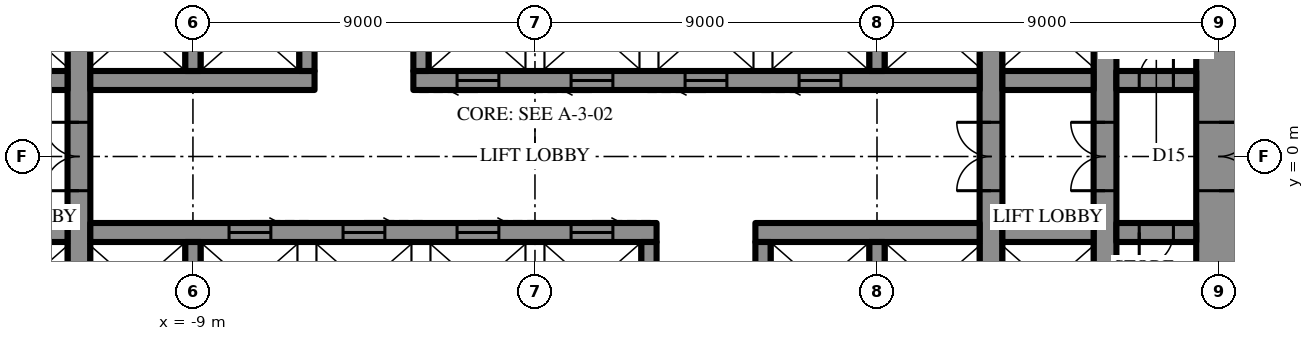
"""IFC4 building model, lengths in metres.
Left out: names, types, materials, properties, quantities, classifications, styles, units other than length and angle.
Written with IfcOpenShell. Run it as: python <this file> out.ifc"""

import sys

from ifc_helpers import new_model, si_unit, direction, frame, frame_2d, origin, place, context, subcontext, project, spatial, rectangle, extrude, element, fill, save


model = new_model("IFC4")
c1 = context("Model", 3, precision=1e-05, world=origin(), true_north=direction((0.0, 1.0)))
c2 = subcontext(c1, "Body", "Model", "MODEL_VIEW")
j1 = project(units=[si_unit("LENGTHUNIT", "METRE"), si_unit("PLANEANGLEUNIT", "RADIAN")], contexts=[c1])
p1 = place(None, origin())
s1 = spatial("IfcSite", under=j1, at=p1, CompositionType="ELEMENT")
p2 = place(p1, origin())
s2 = spatial("IfcBuilding", under=s1, at=p2, CompositionType="ELEMENT")
p3 = place(p2, frame((0.0, 0.0, 182.5)))
s3 = spatial("IfcBuildingStorey", under=s2, at=p3, CompositionType="ELEMENT", Elevation=182.5)
p4 = place(p3, frame((18.0, -10.7, 0.0), z_axis=(0.0, 0.0, 1.0), x_axis=(0.0, 1.0, 0.0)))
e1 = element("IfcWall", 1, at=p4, inside=s3, PredefinedType="SHEAR", context=c2, shape_type="SweptSolid", body=[
    extrude(rectangle(XDim=21.4, YDim=1.2, at=frame_2d((10.7, 0.0))), origin(), (0.0, 0.0, 1.0), 4.2),
])
p5 = place(p4, frame((9.8, 0.0, 0.0)))
e2 = element("IfcOpeningElement", 2, at=p5, cuts=e1, PredefinedType="OPENING", context=c2, shape_type="SweptSolid", body=[
    extrude(rectangle(XDim=1.8, YDim=2.4, at=frame_2d((0.9, 1.2))), frame((0.0, 0.61, 0.0), z_axis=(0.0, -1.0, 0.0), x_axis=(1.0, 0.0, 0.0)), (0.0, 0.0, 1.0), 1.22),
])
p6 = place(p3, frame((12.0, -10.7, 0.0), z_axis=(0.0, 0.0, 1.0), x_axis=(0.0, 1.0, 0.0)))
e3 = element("IfcWall", 3, at=p6, inside=s3, PredefinedType="SHEAR", context=c2, shape_type="SweptSolid", body=[
    extrude(rectangle(XDim=21.4, YDim=0.6, at=frame_2d((10.7, 0.0))), origin(), (0.0, 0.0, 1.0), 4.2),
])
p7 = place(p6, frame((9.8, 0.0, 0.0)))
e4 = element("IfcOpeningElement", 4, at=p7, cuts=e3, PredefinedType="OPENING", context=c2, shape_type="SweptSolid", body=[
    extrude(rectangle(XDim=1.8, YDim=2.4, at=frame_2d((0.9, 1.2))), frame((0.0, 0.31, 0.0), z_axis=(0.0, -1.0, 0.0), x_axis=(1.0, 0.0, 0.0)), (0.0, 0.0, 1.0), 0.62),
])
p8 = place(p3, frame((-12.0, -10.7, 0.0), z_axis=(0.0, 0.0, 1.0), x_axis=(0.0, 1.0, 0.0)))
e5 = element("IfcWall", 5, at=p8, inside=s3, PredefinedType="SHEAR", context=c2, shape_type="SweptSolid", body=[
    extrude(rectangle(XDim=21.4, YDim=0.6, at=frame_2d((10.7, 0.0))), origin(), (0.0, 0.0, 1.0), 4.2),
])
p9 = place(p8, frame((9.8, 0.0, 0.0)))
e6 = element("IfcOpeningElement", 6, at=p9, cuts=e5, PredefinedType="OPENING", context=c2, shape_type="SweptSolid", body=[
    extrude(rectangle(XDim=1.8, YDim=2.4, at=frame_2d((0.9, 1.2))), frame((0.0, 0.31, 0.0), z_axis=(0.0, -1.0, 0.0), x_axis=(1.0, 0.0, 0.0)), (0.0, 0.0, 1.0), 0.62),
])
p10 = place(p3, frame((15.0, -10.7, 0.0), z_axis=(0.0, 0.0, 1.0), x_axis=(0.0, 1.0, 0.0)))
e7 = element("IfcWall", 7, at=p10, inside=s3, PredefinedType="SHEAR", context=c2, shape_type="SweptSolid", body=[
    extrude(rectangle(XDim=21.4, YDim=0.6, at=frame_2d((10.7, 0.0))), origin(), (0.0, 0.0, 1.0), 4.2),
])
p11 = place(p10, frame((9.8, 0.0, 0.0)))
e8 = element("IfcOpeningElement", 8, at=p11, cuts=e7, PredefinedType="OPENING", context=c2, shape_type="SweptSolid", body=[
    extrude(rectangle(XDim=1.8, YDim=2.4, at=frame_2d((0.9, 1.2))), frame((0.0, 0.31, 0.0), z_axis=(0.0, -1.0, 0.0), x_axis=(1.0, 0.0, 0.0)), (0.0, 0.0, 1.0), 0.62),
])
p12 = place(p3, frame((-14.7, 2.0, 0.0), z_axis=(0.0, 0.0, 1.0), x_axis=(1.0, 0.0, 0.0)))
e9 = element("IfcWall", 9, at=p12, inside=s3, PredefinedType="SHEAR", context=c2, shape_type="SweptSolid", body=[
    extrude(rectangle(XDim=2.4, YDim=0.5, at=frame_2d((1.2, 0.0))), origin(), (0.0, 0.0, 1.0), 4.2),
])
p13 = place(p3, frame((-11.7, 2.0, 0.0), z_axis=(0.0, 0.0, 1.0), x_axis=(1.0, 0.0, 0.0)))
e10 = element("IfcWall", 10, at=p13, inside=s3, PredefinedType="SHEAR", context=c2, shape_type="SweptSolid", body=[
    extrude(rectangle(XDim=5.9, YDim=0.5, at=frame_2d((2.95, 0.0))), origin(), (0.0, 0.0, 1.0), 4.2),
])
p14 = place(p3, frame((-3.2, 2.0, 0.0), z_axis=(0.0, 0.0, 1.0), x_axis=(1.0, 0.0, 0.0)))
e11 = element("IfcWall", 11, at=p14, inside=s3, PredefinedType="SHEAR", context=c2, shape_type="SweptSolid", body=[
    extrude(rectangle(XDim=14.9, YDim=0.5, at=frame_2d((7.45, 0.0))), origin(), (0.0, 0.0, 1.0), 4.2),
])
p15 = place(p14, frame((1.15, 0.0, 0.0)))
e12 = element("IfcOpeningElement", 12, at=p15, cuts=e11, PredefinedType="OPENING", context=c2, shape_type="SweptSolid", body=[
    extrude(rectangle(XDim=1.1, YDim=2.2, at=frame_2d((0.55, 1.1))), frame((0.0, 0.26, 0.0), z_axis=(0.0, -1.0, 0.0), x_axis=(1.0, 0.0, 0.0)), (0.0, 0.0, 1.0), 0.52),
])
p16 = place(p14, frame((4.15, 0.0, 0.0)))
e13 = element("IfcOpeningElement", 13, at=p16, cuts=e11, PredefinedType="OPENING", context=c2, shape_type="SweptSolid", body=[
    extrude(rectangle(XDim=1.1, YDim=2.2, at=frame_2d((0.55, 1.1))), frame((0.0, 0.26, 0.0), z_axis=(0.0, -1.0, 0.0), x_axis=(1.0, 0.0, 0.0)), (0.0, 0.0, 1.0), 0.52),
])
p17 = place(p14, frame((7.15, 0.0, 0.0)))
e14 = element("IfcOpeningElement", 14, at=p17, cuts=e11, PredefinedType="OPENING", context=c2, shape_type="SweptSolid", body=[
    extrude(rectangle(XDim=1.1, YDim=2.2, at=frame_2d((0.55, 1.1))), frame((0.0, 0.26, 0.0), z_axis=(0.0, -1.0, 0.0), x_axis=(1.0, 0.0, 0.0)), (0.0, 0.0, 1.0), 0.52),
])
p18 = place(p14, frame((10.15, 0.0, 0.0)))
e15 = element("IfcOpeningElement", 15, at=p18, cuts=e11, PredefinedType="OPENING", context=c2, shape_type="SweptSolid", body=[
    extrude(rectangle(XDim=1.1, YDim=2.2, at=frame_2d((0.55, 1.1))), frame((0.0, 0.26, 0.0), z_axis=(0.0, -1.0, 0.0), x_axis=(1.0, 0.0, 0.0)), (0.0, 0.0, 1.0), 0.52),
])
p19 = place(p3, frame((12.3, 2.0, 0.0), z_axis=(0.0, 0.0, 1.0), x_axis=(1.0, 0.0, 0.0)))
e16 = element("IfcWall", 16, at=p19, inside=s3, PredefinedType="SHEAR", context=c2, shape_type="SweptSolid", body=[
    extrude(rectangle(XDim=2.4, YDim=0.5, at=frame_2d((1.2, 0.0))), origin(), (0.0, 0.0, 1.0), 4.2),
])
p20 = place(p3, frame((15.3, 2.0, 0.0), z_axis=(0.0, 0.0, 1.0), x_axis=(1.0, 0.0, 0.0)))
e17 = element("IfcWall", 17, at=p20, inside=s3, PredefinedType="SHEAR", context=c2, shape_type="SweptSolid", body=[
    extrude(rectangle(XDim=2.1, YDim=0.5, at=frame_2d((1.05, 0.0))), origin(), (0.0, 0.0, 1.0), 4.2),
])
p21 = place(p20, frame((0.6, 0.0, 0.0)))
e18 = element("IfcOpeningElement", 18, at=p21, cuts=e17, PredefinedType="OPENING", context=c2, shape_type="SweptSolid", body=[
    extrude(rectangle(XDim=0.9, YDim=2.2, at=frame_2d((0.45, 1.1))), frame((0.0, 0.26, 0.0), z_axis=(0.0, -1.0, 0.0), x_axis=(1.0, 0.0, 0.0)), (0.0, 0.0, 1.0), 0.52),
])
for number, where, z_axis, x_axis in (
    (19, (-9.0, 2.25, 0.0), (0.0, 0.0, 1.0), (0.0, 1.0, 0.0)),
    (20, (-6.0, 2.25, 0.0), (0.0, 0.0, 1.0), (0.0, 1.0, 0.0)),
    (21, (-3.0, 2.25, 0.0), (0.0, 0.0, 1.0), (0.0, 1.0, 0.0)),
    (22, (9.0, 2.25, 0.0), (0.0, 0.0, 1.0), (0.0, 1.0, 0.0)),
):
    element("IfcWall", number, at=place(p3, frame(where, z_axis=z_axis, x_axis=x_axis)), inside=s3, PredefinedType="SHEAR", context=c2, shape_type="SweptSolid", body=[
        extrude(rectangle(XDim=2.3, YDim=0.4, at=frame_2d((1.15, 0.0))), origin(), (0.0, 0.0, 1.0), 4.2),
    ])
p22 = place(p3, frame((17.4, -2.0, 0.0), z_axis=(0.0, 0.0, 1.0), x_axis=(-1.0, 0.0, 0.0)))
e23 = element("IfcWall", 23, at=p22, inside=s3, PredefinedType="SHEAR", context=c2, shape_type="SweptSolid", body=[
    extrude(rectangle(XDim=2.1, YDim=0.5, at=frame_2d((1.05, 0.0))), origin(), (0.0, 0.0, 1.0), 4.2),
])
p23 = place(p22, frame((0.6, 0.0, 0.0)))
e24 = element("IfcOpeningElement", 24, at=p23, cuts=e23, PredefinedType="OPENING", context=c2, shape_type="SweptSolid", body=[
    extrude(rectangle(XDim=0.9, YDim=2.2, at=frame_2d((0.45, 1.1))), frame((0.0, 0.26, 0.0), z_axis=(0.0, -1.0, 0.0), x_axis=(1.0, 0.0, 0.0)), (0.0, 0.0, 1.0), 0.52),
])
p24 = place(p3, frame((14.7, -2.0, 0.0), z_axis=(0.0, 0.0, 1.0), x_axis=(-1.0, 0.0, 0.0)))
e25 = element("IfcWall", 25, at=p24, inside=s3, PredefinedType="SHEAR", context=c2, shape_type="SweptSolid", body=[
    extrude(rectangle(XDim=2.4, YDim=0.5, at=frame_2d((1.2, 0.0))), origin(), (0.0, 0.0, 1.0), 4.2),
])
p25 = place(p3, frame((11.7, -2.0, 0.0), z_axis=(0.0, 0.0, 1.0), x_axis=(-1.0, 0.0, 0.0)))
e26 = element("IfcWall", 26, at=p25, inside=s3, PredefinedType="SHEAR", context=c2, shape_type="SweptSolid", body=[
    extrude(rectangle(XDim=5.9, YDim=0.5, at=frame_2d((2.95, 0.0))), origin(), (0.0, 0.0, 1.0), 4.2),
])
p26 = place(p3, frame((3.2, -2.0, 0.0), z_axis=(0.0, 0.0, 1.0), x_axis=(-1.0, 0.0, 0.0)))
e27 = element("IfcWall", 27, at=p26, inside=s3, PredefinedType="SHEAR", context=c2, shape_type="SweptSolid", body=[
    extrude(rectangle(XDim=14.9, YDim=0.5, at=frame_2d((7.45, 0.0))), origin(), (0.0, 0.0, 1.0), 4.2),
])
p27 = place(p26, frame((1.15, 0.0, 0.0)))
e28 = element("IfcOpeningElement", 28, at=p27, cuts=e27, PredefinedType="OPENING", context=c2, shape_type="SweptSolid", body=[
    extrude(rectangle(XDim=1.1, YDim=2.2, at=frame_2d((0.55, 1.1))), frame((0.0, 0.26, 0.0), z_axis=(0.0, -1.0, 0.0), x_axis=(1.0, 0.0, 0.0)), (0.0, 0.0, 1.0), 0.52),
])
p28 = place(p26, frame((4.15, 0.0, 0.0)))
e29 = element("IfcOpeningElement", 29, at=p28, cuts=e27, PredefinedType="OPENING", context=c2, shape_type="SweptSolid", body=[
    extrude(rectangle(XDim=1.1, YDim=2.2, at=frame_2d((0.55, 1.1))), frame((0.0, 0.26, 0.0), z_axis=(0.0, -1.0, 0.0), x_axis=(1.0, 0.0, 0.0)), (0.0, 0.0, 1.0), 0.52),
])
p29 = place(p26, frame((7.15, 0.0, 0.0)))
e30 = element("IfcOpeningElement", 30, at=p29, cuts=e27, PredefinedType="OPENING", context=c2, shape_type="SweptSolid", body=[
    extrude(rectangle(XDim=1.1, YDim=2.2, at=frame_2d((0.55, 1.1))), frame((0.0, 0.26, 0.0), z_axis=(0.0, -1.0, 0.0), x_axis=(1.0, 0.0, 0.0)), (0.0, 0.0, 1.0), 0.52),
])
p30 = place(p26, frame((10.15, 0.0, 0.0)))
e31 = element("IfcOpeningElement", 31, at=p30, cuts=e27, PredefinedType="OPENING", context=c2, shape_type="SweptSolid", body=[
    extrude(rectangle(XDim=1.1, YDim=2.2, at=frame_2d((0.55, 1.1))), frame((0.0, 0.26, 0.0), z_axis=(0.0, -1.0, 0.0), x_axis=(1.0, 0.0, 0.0)), (0.0, 0.0, 1.0), 0.52),
])
p31 = place(p3, frame((-12.3, -2.0, 0.0), z_axis=(0.0, 0.0, 1.0), x_axis=(-1.0, 0.0, 0.0)))
e32 = element("IfcWall", 32, at=p31, inside=s3, PredefinedType="SHEAR", context=c2, shape_type="SweptSolid", body=[
    extrude(rectangle(XDim=2.4, YDim=0.5, at=frame_2d((1.2, 0.0))), origin(), (0.0, 0.0, 1.0), 4.2),
])
for number, where, z_axis, x_axis in (
    (33, (9.0, -2.25, 0.0), (0.0, 0.0, 1.0), (0.0, -1.0, 0.0)),
    (34, (6.0, -2.25, 0.0), (0.0, 0.0, 1.0), (0.0, -1.0, 0.0)),
    (35, (3.0, -2.25, 0.0), (0.0, 0.0, 1.0), (0.0, -1.0, 0.0)),
    (36, (-9.0, -2.25, 0.0), (0.0, 0.0, 1.0), (0.0, -1.0, 0.0)),
):
    element("IfcWall", number, at=place(p3, frame(where, z_axis=z_axis, x_axis=x_axis)), inside=s3, PredefinedType="SHEAR", context=c2, shape_type="SweptSolid", body=[
        extrude(rectangle(XDim=2.3, YDim=0.4, at=frame_2d((1.15, 0.0))), origin(), (0.0, 0.0, 1.0), 4.2),
    ])
p32 = place(p5, frame((1.8, 0.0, 0.0), z_axis=(0.0, 0.0, 1.0), x_axis=(-1.0, 0.0, 0.0)))
e37 = element("IfcDoor", 37, at=p32, inside=s3, OperationType="DOUBLE_DOOR_SINGLE_SWING", PredefinedType="DOOR", context=c2, shape_type="SweptSolid", body=[
    extrude(rectangle(XDim=1.8, YDim=2.4, at=frame_2d((0.9, 1.2))), frame((0.0, 0.025, 0.0), z_axis=(0.0, -1.0, 0.0), x_axis=(1.0, 0.0, 0.0)), (0.0, 0.0, 1.0), 0.05),
])
fill(e2, e37)
p33 = place(p21, origin())
e38 = element("IfcDoor", 38, at=p33, inside=s3, OperationType="SINGLE_SWING_LEFT", PredefinedType="DOOR", context=c2, shape_type="SweptSolid", body=[
    extrude(rectangle(XDim=0.9, YDim=2.2, at=frame_2d((0.45, 1.1))), frame((0.0, 0.025, 0.0), z_axis=(0.0, -1.0, 0.0), x_axis=(1.0, 0.0, 0.0)), (0.0, 0.0, 1.0), 0.05),
])
fill(e18, e38)
p34 = place(p23, origin())
e39 = element("IfcDoor", 39, at=p34, inside=s3, OperationType="SINGLE_SWING_LEFT", PredefinedType="DOOR", context=c2, shape_type="SweptSolid", body=[
    extrude(rectangle(XDim=0.9, YDim=2.2, at=frame_2d((0.45, 1.1))), frame((0.0, 0.025, 0.0), z_axis=(0.0, -1.0, 0.0), x_axis=(1.0, 0.0, 0.0)), (0.0, 0.0, 1.0), 0.05),
])
fill(e24, e39)
p35 = place(p7, origin())
e40 = element("IfcDoor", 40, at=p35, inside=s3, OperationType="DOUBLE_DOOR_SINGLE_SWING", PredefinedType="DOOR", context=c2, shape_type="SweptSolid", body=[
    extrude(rectangle(XDim=1.8, YDim=2.4, at=frame_2d((0.9, 1.2))), frame((0.0, 0.025, 0.0), z_axis=(0.0, -1.0, 0.0), x_axis=(1.0, 0.0, 0.0)), (0.0, 0.0, 1.0), 0.05),
])
fill(e4, e40)
p36 = place(p9, origin())
e41 = element("IfcDoor", 41, at=p36, inside=s3, OperationType="DOUBLE_DOOR_SINGLE_SWING", PredefinedType="DOOR", context=c2, shape_type="SweptSolid", body=[
    extrude(rectangle(XDim=1.8, YDim=2.4, at=frame_2d((0.9, 1.2))), frame((0.0, 0.025, 0.0), z_axis=(0.0, -1.0, 0.0), x_axis=(1.0, 0.0, 0.0)), (0.0, 0.0, 1.0), 0.05),
])
fill(e6, e41)
p37 = place(p11, origin())
e42 = element("IfcDoor", 42, at=p37, inside=s3, OperationType="DOUBLE_DOOR_SINGLE_SWING", PredefinedType="DOOR", context=c2, shape_type="SweptSolid", body=[
    extrude(rectangle(XDim=1.8, YDim=2.4, at=frame_2d((0.9, 1.2))), frame((0.0, 0.025, 0.0), z_axis=(0.0, -1.0, 0.0), x_axis=(1.0, 0.0, 0.0)), (0.0, 0.0, 1.0), 0.05),
])
fill(e8, e42)
p38 = place(p15, frame((1.1, 0.0, 0.0), z_axis=(0.0, 0.0, 1.0), x_axis=(-1.0, 0.0, 0.0)))
e43 = element("IfcDoor", 43, at=p38, inside=s3, OperationType="SLIDING_TO_LEFT", PredefinedType="DOOR", context=c2, shape_type="SweptSolid", body=[
    extrude(rectangle(XDim=1.1, YDim=2.2, at=frame_2d((0.55, 1.1))), frame((0.0, 0.025, 0.0), z_axis=(0.0, -1.0, 0.0), x_axis=(1.0, 0.0, 0.0)), (0.0, 0.0, 1.0), 0.05),
])
fill(e12, e43)
p39 = place(p16, frame((1.1, 0.0, 0.0), z_axis=(0.0, 0.0, 1.0), x_axis=(-1.0, 0.0, 0.0)))
e44 = element("IfcDoor", 44, at=p39, inside=s3, OperationType="SLIDING_TO_LEFT", PredefinedType="DOOR", context=c2, shape_type="SweptSolid", body=[
    extrude(rectangle(XDim=1.1, YDim=2.2, at=frame_2d((0.55, 1.1))), frame((0.0, 0.025, 0.0), z_axis=(0.0, -1.0, 0.0), x_axis=(1.0, 0.0, 0.0)), (0.0, 0.0, 1.0), 0.05),
])
fill(e13, e44)
p40 = place(p17, frame((1.1, 0.0, 0.0), z_axis=(0.0, 0.0, 1.0), x_axis=(-1.0, 0.0, 0.0)))
e45 = element("IfcDoor", 45, at=p40, inside=s3, OperationType="SLIDING_TO_LEFT", PredefinedType="DOOR", context=c2, shape_type="SweptSolid", body=[
    extrude(rectangle(XDim=1.1, YDim=2.2, at=frame_2d((0.55, 1.1))), frame((0.0, 0.025, 0.0), z_axis=(0.0, -1.0, 0.0), x_axis=(1.0, 0.0, 0.0)), (0.0, 0.0, 1.0), 0.05),
])
fill(e14, e45)
p41 = place(p18, frame((1.1, 0.0, 0.0), z_axis=(0.0, 0.0, 1.0), x_axis=(-1.0, 0.0, 0.0)))
e46 = element("IfcDoor", 46, at=p41, inside=s3, OperationType="SLIDING_TO_LEFT", PredefinedType="DOOR", context=c2, shape_type="SweptSolid", body=[
    extrude(rectangle(XDim=1.1, YDim=2.2, at=frame_2d((0.55, 1.1))), frame((0.0, 0.025, 0.0), z_axis=(0.0, -1.0, 0.0), x_axis=(1.0, 0.0, 0.0)), (0.0, 0.0, 1.0), 0.05),
])
fill(e15, e46)
p42 = place(p27, frame((1.1, 0.0, 0.0), z_axis=(0.0, 0.0, 1.0), x_axis=(-1.0, 0.0, 0.0)))
e47 = element("IfcDoor", 47, at=p42, inside=s3, OperationType="SLIDING_TO_LEFT", PredefinedType="DOOR", context=c2, shape_type="SweptSolid", body=[
    extrude(rectangle(XDim=1.1, YDim=2.2, at=frame_2d((0.55, 1.1))), frame((0.0, 0.025, 0.0), z_axis=(0.0, -1.0, 0.0), x_axis=(1.0, 0.0, 0.0)), (0.0, 0.0, 1.0), 0.05),
])
fill(e28, e47)
p43 = place(p28, frame((1.1, 0.0, 0.0), z_axis=(0.0, 0.0, 1.0), x_axis=(-1.0, 0.0, 0.0)))
e48 = element("IfcDoor", 48, at=p43, inside=s3, OperationType="SLIDING_TO_LEFT", PredefinedType="DOOR", context=c2, shape_type="SweptSolid", body=[
    extrude(rectangle(XDim=1.1, YDim=2.2, at=frame_2d((0.55, 1.1))), frame((0.0, 0.025, 0.0), z_axis=(0.0, -1.0, 0.0), x_axis=(1.0, 0.0, 0.0)), (0.0, 0.0, 1.0), 0.05),
])
fill(e29, e48)
p44 = place(p29, frame((1.1, 0.0, 0.0), z_axis=(0.0, 0.0, 1.0), x_axis=(-1.0, 0.0, 0.0)))
e49 = element("IfcDoor", 49, at=p44, inside=s3, OperationType="SLIDING_TO_LEFT", PredefinedType="DOOR", context=c2, shape_type="SweptSolid", body=[
    extrude(rectangle(XDim=1.1, YDim=2.2, at=frame_2d((0.55, 1.1))), frame((0.0, 0.025, 0.0), z_axis=(0.0, -1.0, 0.0), x_axis=(1.0, 0.0, 0.0)), (0.0, 0.0, 1.0), 0.05),
])
fill(e30, e49)
p45 = place(p30, frame((1.1, 0.0, 0.0), z_axis=(0.0, 0.0, 1.0), x_axis=(-1.0, 0.0, 0.0)))
e50 = element("IfcDoor", 50, at=p45, inside=s3, OperationType="SLIDING_TO_LEFT", PredefinedType="DOOR", context=c2, shape_type="SweptSolid", body=[
    extrude(rectangle(XDim=1.1, YDim=2.2, at=frame_2d((0.55, 1.1))), frame((0.0, 0.025, 0.0), z_axis=(0.0, -1.0, 0.0), x_axis=(1.0, 0.0, 0.0)), (0.0, 0.0, 1.0), 0.05),
])
fill(e31, e50)
save(model, sys.argv[1])
